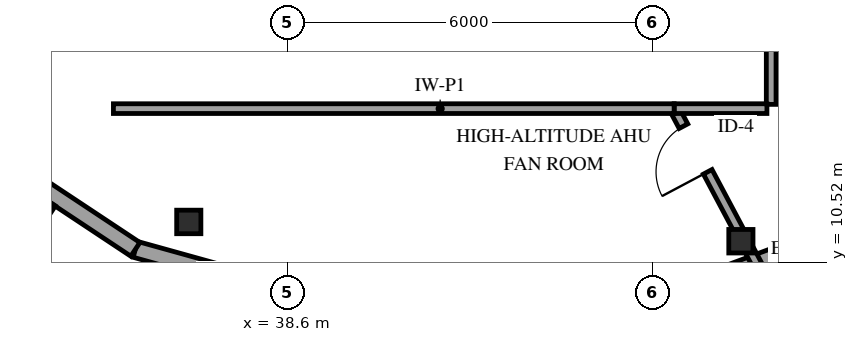
"""IFC4 building model, lengths in metres.
Left out: names, types, materials, properties, quantities, classifications, styles, units other than length and angle.
Written with IfcOpenShell. Run it as: python <this file> out.ifc"""

import sys

from ifc_helpers import new_model, si_unit, direction, frame, frame_2d, origin, origin_2d, place, context, subcontext, project, spatial, rectangle, i_section, extrude, element, fill, save


model = new_model("IFC4")
c1 = context("Model", 3, precision=1e-05, world=origin(), true_north=direction((0.0, 1.0)))
c2 = subcontext(c1, "Body", "Model", "MODEL_VIEW")
j1 = project(units=[si_unit("LENGTHUNIT", "METRE"), si_unit("PLANEANGLEUNIT", "RADIAN")], contexts=[c1])
p1 = place(None, origin())
s1 = spatial("IfcSite", under=j1, at=p1, CompositionType="ELEMENT")
p2 = place(p1, origin())
s2 = spatial("IfcBuilding", under=s1, at=p2, CompositionType="ELEMENT")
p3 = place(p2, frame((0.0, 0.0, 309.85)))
s3 = spatial("IfcBuildingStorey", under=s2, at=p3, CompositionType="ELEMENT", Elevation=309.85)
for number, where, z_axis, x_axis in (
    (1, (36.972, 11.187, 0.0), (0.0, 0.0, 1.0), (1.0, 0.0, 0.0)),
    (2, (46.052, 10.869, 0.0), (0.0, 0.0, 1.0), (1.0, 0.0, 0.0)),
):
    element("IfcColumn", number, at=place(p3, frame(where, z_axis=z_axis, x_axis=x_axis)), inside=s3, PredefinedType="COLUMN", context=c2, shape_type="SweptSolid", body=[
        extrude(i_section(OverallWidth=0.398, OverallDepth=0.387, WebThickness=0.021, FlangeThickness=0.033, FilletRadius=0.038, at=origin_2d()), origin(), (0.0, 0.0, 1.0), 4.2),
    ])
p4 = place(p3, frame((36.094, 10.736, 0.0), z_axis=(0.0, 0.0, 1.0), x_axis=(0.9634471278, -0.267898547838, 0.0)))
e3 = element("IfcWall", 3, at=p4, inside=s3, PredefinedType="SOLIDWALL", context=c2, shape_type="SweptSolid", body=[
    extrude(rectangle(XDim=2.966, YDim=0.27, at=frame_2d((1.483, 0.0))), origin(), (0.0, 0.0, 1.0), 3.195),
])
p5 = place(p3, frame((30.606, 14.373, 0.0), z_axis=(0.0, 0.0, 1.0), x_axis=(0.833507833443, -0.552507639394, 0.0)))
e4 = element("IfcWall", 4, at=p5, inside=s3, PredefinedType="SOLIDWALL", context=c2, shape_type="SweptSolid", body=[
    extrude(rectangle(XDim=6.584, YDim=0.27, at=frame_2d((3.292, 0.0))), origin(), (0.0, 0.0, 1.0), 3.195),
])
p6 = place(p3, frame((45.53, 10.223, 0.0), z_axis=(0.0, 0.0, 1.0), x_axis=(0.936896155524, 0.349607771316, 0.0)))
e5 = element("IfcWall", 5, at=p6, inside=s3, PredefinedType="SOLIDWALL", context=c2, shape_type="SweptSolid", body=[
    extrude(rectangle(XDim=2.967, YDim=0.27, at=frame_2d((1.483, 0.0))), origin(), (0.0, 0.0, 1.0), 3.195),
])
p7 = place(p3, frame((46.55, 26.401, 0.0), z_axis=(0.0, 0.0, 1.0), x_axis=(0.0, -1.0, 0.0)))
e6 = element("IfcWall", 6, at=p7, inside=s3, PredefinedType="PARTITIONING", context=c2, shape_type="SweptSolid", body=[
    extrude(rectangle(XDim=13.281, YDim=0.16, at=frame_2d((6.64, 0.0))), origin(), (0.0, 0.0, 1.0), 3.895),
])
p8 = place(p7, frame((6.166, 0.0, 0.0)))
e7 = element("IfcOpeningElement", 7, at=p8, cuts=e6, PredefinedType="OPENING", context=c2, shape_type="SweptSolid", body=[
    extrude(rectangle(XDim=0.95, YDim=2.15, at=frame_2d((0.475, 1.075))), frame((0.0, 0.09, 0.0), z_axis=(0.0, -1.0, 0.0), x_axis=(1.0, 0.0, 0.0)), (0.0, 0.0, 1.0), 0.18),
])
p9 = place(p3, frame((46.366, 10.393, 0.0), z_axis=(0.0, 0.0, 1.0), x_axis=(-0.46924421405, 0.883068438787, 0.0)))
e8 = element("IfcWall", 8, at=p9, inside=s3, PredefinedType="PARTITIONING", context=c2, shape_type="SweptSolid", body=[
    extrude(rectangle(XDim=3.009, YDim=0.16, at=frame_2d((1.504, 0.0))), origin(), (0.0, 0.0, 1.0), 3.19),
])
p10 = place(p9, frame((1.832, 0.0, 0.0)))
e9 = element("IfcOpeningElement", 9, at=p10, cuts=e8, PredefinedType="OPENING", context=c2, shape_type="SweptSolid", body=[
    extrude(rectangle(XDim=0.85, YDim=2.1, at=frame_2d((0.425, 1.05))), frame((0.0, 0.09, 0.0), z_axis=(0.0, -1.0, 0.0), x_axis=(1.0, 0.0, 0.0)), (0.0, 0.0, 1.0), 0.18),
])
p11 = place(p3, frame((46.48, 13.05, 0.0), z_axis=(0.0, 0.0, 1.0), x_axis=(-1.0, 0.0, 0.0)))
e10 = element("IfcWall", 10, at=p11, inside=s3, PredefinedType="PARTITIONING", context=c2, shape_type="SweptSolid", body=[
    extrude(rectangle(XDim=1.526, YDim=0.16, at=frame_2d((0.763, 0.0))), origin(), (0.0, 0.0, 1.0), 3.895),
])
p12 = place(p3, frame((44.954, 13.05, 0.0), z_axis=(0.0, 0.0, 1.0), x_axis=(-1.0, 0.0, 0.0)))
e11 = element("IfcWall", 11, at=p12, inside=s3, PredefinedType="PARTITIONING", context=c2, shape_type="SweptSolid", body=[
    extrude(rectangle(XDim=9.221, YDim=0.16, at=frame_2d((4.611, 0.0))), origin(), (0.0, 0.0, 1.0), 3.895),
])
p13 = place(p10, origin())
e12 = element("IfcDoor", 12, at=p13, inside=s3, OperationType="SINGLE_SWING_LEFT", PredefinedType="DOOR", context=c2, shape_type="SweptSolid", body=[
    extrude(rectangle(XDim=0.85, YDim=2.1, at=frame_2d((0.425, 1.05))), frame((0.0, 0.025, 0.0), z_axis=(0.0, -1.0, 0.0), x_axis=(1.0, 0.0, 0.0)), (0.0, 0.0, 1.0), 0.05),
])
fill(e9, e12)
save(model, sys.argv[1])
